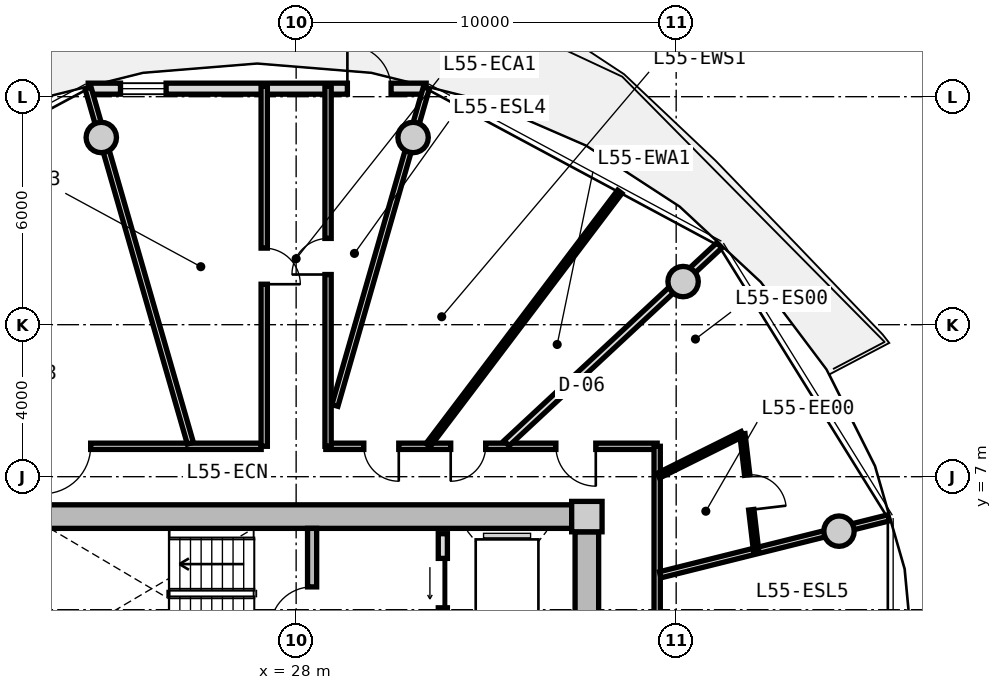
"""IFC4 building model, lengths in metres.
Left out: names, types, materials, properties, quantities, classifications, styles, units other than length and angle.
Written with IfcOpenShell. Run it as: python <this file> out.ifc"""

import sys

from ifc_helpers import new_model, si_unit, direction, frame, frame_2d, origin, origin_2d, place, context, subcontext, project, spatial, rectangle, circle, extrude, source, transform, mapped, element, fill, save


model = new_model("IFC4")
c1 = context("Model", 3, precision=1e-05, world=origin(), true_north=direction((0.0, 1.0)))
c2 = subcontext(c1, "Body", "Model", "MODEL_VIEW")
j1 = project(units=[si_unit("LENGTHUNIT", "METRE"), si_unit("PLANEANGLEUNIT", "RADIAN")], contexts=[c1])
p1 = place(None, origin())
s1 = spatial("IfcSite", under=j1, at=p1, CompositionType="ELEMENT")
p2 = place(p1, origin())
s2 = spatial("IfcBuilding", under=s1, at=p2, CompositionType="ELEMENT")
p3 = place(p2, frame((0.0, 0.0, 177.0)))
s3 = spatial("IfcBuildingStorey", under=s2, at=p3, CompositionType="ELEMENT", Elevation=177.0)
m1 = source(origin(), c2, "Body", "SweptSolid", [
    extrude(rectangle(XDim=0.8, YDim=0.8, at=origin_2d()), origin(), (0.0, 0.0, 1.0), 3.05),
])
p4 = place(p3, frame((35.65, 5.95, 0.0), z_axis=(0.0, 0.0, 1.0), x_axis=(1.0, 0.0, 0.0)))
e1 = element("IfcColumn", 1, at=p4, inside=s3, PredefinedType="COLUMN", context=c2, shape_type="MappedRepresentation", body=[
    mapped(m1, transform((0.0, 0.0, 0.0), x_axis=(1.0, 0.0, 0.0), y_axis=(0.0, 1.0, 0.0), z_axis=(0.0, 0.0, 1.0), scale=1.0)),
])
m2 = source(origin(), c2, "Body", "SweptSolid", [
    extrude(rectangle(XDim=14.5, YDim=0.62, at=frame_2d((7.25, 0.0))), origin(), (0.0, 0.0, 1.0), 2.81),
])
p5 = place(p3, frame((20.75, 5.95, 0.0), z_axis=(0.0, 0.0, 1.0), x_axis=(1.0, 0.0, 0.0)))
e2 = element("IfcWall", 2, at=p5, inside=s3, PredefinedType="SHEAR", context=c2, shape_type="MappedRepresentation", body=[
    mapped(m2, transform((0.0, 0.0, 0.0), x_axis=(1.0, 0.0, 0.0), y_axis=(0.0, 1.0, 0.0), z_axis=(0.0, 0.0, 1.0), scale=1.0)),
])
m3 = source(origin(), c2, "Body", "SweptSolid", [
    extrude(rectangle(XDim=11.1, YDim=0.62, at=frame_2d((5.55, 0.0))), origin(), (0.0, 0.0, 1.0), 2.81),
])
p6 = place(p3, frame((35.65, 5.55, 0.0), z_axis=(0.0, 0.0, 1.0), x_axis=(0.0, -1.0, 0.0)))
e3 = element("IfcWall", 3, at=p6, inside=s3, PredefinedType="SHEAR", context=c2, shape_type="MappedRepresentation", body=[
    mapped(m3, transform((0.0, 0.0, 0.0), x_axis=(1.0, 0.0, 0.0), y_axis=(0.0, 1.0, 0.0), z_axis=(0.0, 0.0, 1.0), scale=1.0)),
])
p7 = place(p6, frame((5.65, 0.0, 0.0)))
e4 = element("IfcOpeningElement", 4, at=p7, cuts=e3, PredefinedType="OPENING", context=c2, shape_type="SweptSolid", body=[
    extrude(rectangle(XDim=1.2, YDim=2.15, at=frame_2d((0.6, 1.075))), frame((0.0, 0.32, 0.0), z_axis=(0.0, -1.0, 0.0), x_axis=(1.0, 0.0, 0.0)), (0.0, 0.0, 1.0), 0.64),
])
m4 = source(origin(), c2, "Body", "SweptSolid", [
    extrude(circle(Radius=0.4, at=origin_2d()), origin(), (0.0, 0.0, 1.0), 3.05),
])
for number, where, z_axis, x_axis in (
    (5, (42.285, 5.567, 0.0), (0.0, 0.0, 1.0), (1.0, 0.0, 0.0)),
    (6, (38.183, 12.135, 0.0), (0.0, 0.0, 1.0), (1.0, 0.0, 0.0)),
    (7, (31.077, 15.926, 0.0), (0.0, 0.0, 1.0), (1.0, 0.0, 0.0)),
    (8, (22.873, 15.926, 0.0), (0.0, 0.0, 1.0), (1.0, 0.0, 0.0)),
):
    element("IfcColumn", number, at=place(p3, frame(where, z_axis=z_axis, x_axis=x_axis)), inside=s3, PredefinedType="COLUMN", context=c2, shape_type="MappedRepresentation", body=[
        mapped(m4, transform((0.0, 0.0, 0.0), x_axis=(1.0, 0.0, 0.0), y_axis=(0.0, 1.0, 0.0), z_axis=(0.0, 0.0, 1.0), scale=1.0)),
    ])
m5 = source(origin(), c2, "Body", "SweptSolid", [
    extrude(rectangle(XDim=8.893, YDim=0.29, at=frame_2d((4.447, 0.0))), origin(), (0.0, 0.0, 1.0), 2.81),
])
p8 = place(p3, frame((22.529, 17.211, 0.0), z_axis=(0.0, 0.0, 1.0), x_axis=(1.0, 0.0, 0.0)))
e9 = element("IfcWall", 9, at=p8, inside=s3, PredefinedType="SOLIDWALL", context=c2, shape_type="MappedRepresentation", body=[
    mapped(m5, transform((0.0, 0.0, 0.0), x_axis=(1.0, 0.0, 0.0), y_axis=(0.0, 1.0, 0.0), z_axis=(0.0, 0.0, 1.0), scale=1.0)),
])
p9 = place(p8, frame((6.82, 0.0, 0.0)))
e10 = element("IfcOpeningElement", 10, at=p9, cuts=e9, PredefinedType="OPENING", context=c2, shape_type="SweptSolid", body=[
    extrude(rectangle(XDim=1.15, YDim=2.25, at=frame_2d((0.575, 1.125))), frame((0.0, 0.155, 0.0), z_axis=(0.0, -1.0, 0.0), x_axis=(1.0, 0.0, 0.0)), (0.0, 0.0, 1.0), 0.31),
])
p10 = place(p8, frame((0.85, 0.0, 0.85)))
e11 = element("IfcOpeningElement", 11, at=p10, cuts=e9, PredefinedType="OPENING", context=c2, shape_type="SweptSolid", body=[
    extrude(rectangle(XDim=1.2, YDim=1.5, at=frame_2d((0.6, 0.75))), frame((0.0, 0.155, 0.0), z_axis=(0.0, -1.0, 0.0), x_axis=(1.0, 0.0, 0.0)), (0.0, 0.0, 1.0), 0.31),
])
m6 = source(origin(), c2, "Body", "SweptSolid", [
    extrude(rectangle(XDim=3.19, YDim=0.24, at=frame_2d((1.595, 0.0))), origin(), (0.0, 0.0, 1.0), 2.81),
])
p11 = place(p3, frame((28.42, 2.45, 0.0), z_axis=(0.0, 0.0, 1.0), x_axis=(0.0, 1.0, 0.0)))
e12 = element("IfcWall", 12, at=p11, inside=s3, PredefinedType="PARTITIONING", context=c2, shape_type="MappedRepresentation", body=[
    mapped(m6, transform((0.0, 0.0, 0.0), x_axis=(1.0, 0.0, 0.0), y_axis=(0.0, 1.0, 0.0), z_axis=(0.0, 0.0, 1.0), scale=1.0)),
])
p12 = place(p11, frame((0.55, 0.0, 0.0)))
e13 = element("IfcOpeningElement", 13, at=p12, cuts=e12, PredefinedType="OPENING", context=c2, shape_type="SweptSolid", body=[
    extrude(rectangle(XDim=1.1, YDim=2.15, at=frame_2d((0.55, 1.075))), frame((0.0, 0.13, 0.0), z_axis=(0.0, -1.0, 0.0), x_axis=(1.0, 0.0, 0.0)), (0.0, 0.0, 1.0), 0.26),
])
m7 = source(origin(), c2, "Body", "SweptSolid", [
    extrude(rectangle(XDim=5.0, YDim=0.24, at=frame_2d((2.5, 0.0))), origin(), (0.0, 0.0, 1.0), 2.795),
])
p13 = place(p3, frame((31.86, 0.5, 0.0), z_axis=(0.0, 0.0, 1.0), x_axis=(0.0, 1.0, 0.0)))
e14 = element("IfcWall", 14, at=p13, inside=s3, PredefinedType="PARTITIONING", context=c2, shape_type="MappedRepresentation", body=[
    mapped(m7, transform((0.0, 0.0, 0.0), x_axis=(1.0, 0.0, 0.0), y_axis=(0.0, 1.0, 0.0), z_axis=(0.0, 0.0, 1.0), scale=1.0)),
])
p14 = place(p13, frame((3.05, 0.0, 0.0)))
e15 = element("IfcOpeningElement", 15, at=p14, cuts=e14, PredefinedType="OPENING", context=c2, shape_type="SweptSolid", body=[
    extrude(rectangle(XDim=1.3, YDim=2.2, at=frame_2d((0.65, 1.1))), frame((0.0, 0.13, 0.0), z_axis=(0.0, -1.0, 0.0), x_axis=(1.0, 0.0, 0.0)), (0.0, 0.0, 1.0), 0.26),
])
p15 = place(p13, frame((0.55, 0.0, 0.0)))
e16 = element("IfcOpeningElement", 16, at=p15, cuts=e14, PredefinedType="OPENING", context=c2, shape_type="SweptSolid", body=[
    extrude(rectangle(XDim=1.3, YDim=2.2, at=frame_2d((0.65, 1.1))), frame((0.0, 0.13, 0.0), z_axis=(0.0, -1.0, 0.0), x_axis=(1.0, 0.0, 0.0)), (0.0, 0.0, 1.0), 0.26),
])
m8 = source(origin(), c2, "Body", "SweptSolid", [
    extrude(rectangle(XDim=8.58, YDim=0.165, at=frame_2d((4.29, 0.0))), origin(), (0.0, 0.0, 1.0), 2.795),
])
p16 = place(p3, frame((18.5, 7.8, 0.0), z_axis=(0.0, 0.0, 1.0), x_axis=(1.0, 0.0, 0.0)))
e17 = element("IfcWall", 17, at=p16, inside=s3, PredefinedType="PARTITIONING", context=c2, shape_type="MappedRepresentation", body=[
    mapped(m8, transform((0.0, 0.0, 0.0), x_axis=(1.0, 0.0, 0.0), y_axis=(0.0, 1.0, 0.0), z_axis=(0.0, 0.0, 1.0), scale=1.0)),
])
p17 = place(p16, frame((2.843, 0.0, 0.0)))
e18 = element("IfcOpeningElement", 18, at=p17, cuts=e17, PredefinedType="OPENING", context=c2, shape_type="SweptSolid", body=[
    extrude(rectangle(XDim=1.25, YDim=2.2, at=frame_2d((0.625, 1.1))), frame((0.0, 0.093, 0.0), z_axis=(0.0, -1.0, 0.0), x_axis=(1.0, 0.0, 0.0)), (0.0, 0.0, 1.0), 0.185),
])
m9 = source(origin(), c2, "Body", "SweptSolid", [
    extrude(rectangle(XDim=8.719, YDim=0.165, at=frame_2d((4.36, 0.0))), origin(), (0.0, 0.0, 1.0), 2.795),
])
p18 = place(p3, frame((28.781, 7.8, 0.0), z_axis=(0.0, 0.0, 1.0), x_axis=(1.0, 0.0, 0.0)))
e19 = element("IfcWall", 19, at=p18, inside=s3, PredefinedType="PARTITIONING", context=c2, shape_type="MappedRepresentation", body=[
    mapped(m9, transform((0.0, 0.0, 0.0), x_axis=(1.0, 0.0, 0.0), y_axis=(0.0, 1.0, 0.0), z_axis=(0.0, 0.0, 1.0), scale=1.0)),
])
p19 = place(p18, frame((6.054, 0.0, 0.0)))
e20 = element("IfcOpeningElement", 20, at=p19, cuts=e19, PredefinedType="OPENING", context=c2, shape_type="SweptSolid", body=[
    extrude(rectangle(XDim=1.05, YDim=2.15, at=frame_2d((0.525, 1.075))), frame((0.0, 0.093, 0.0), z_axis=(0.0, -1.0, 0.0), x_axis=(1.0, 0.0, 0.0)), (0.0, 0.0, 1.0), 0.185),
])
p20 = place(p18, frame((3.287, 0.0, 0.0)))
e21 = element("IfcOpeningElement", 21, at=p20, cuts=e19, PredefinedType="OPENING", context=c2, shape_type="SweptSolid", body=[
    extrude(rectangle(XDim=0.92, YDim=2.1, at=frame_2d((0.46, 1.05))), frame((0.0, 0.093, 0.0), z_axis=(0.0, -1.0, 0.0), x_axis=(1.0, 0.0, 0.0)), (0.0, 0.0, 1.0), 0.185),
])
p21 = place(p18, frame((1.0, 0.0, 0.0)))
e22 = element("IfcOpeningElement", 22, at=p21, cuts=e19, PredefinedType="OPENING", context=c2, shape_type="SweptSolid", body=[
    extrude(rectangle(XDim=0.92, YDim=2.1, at=frame_2d((0.46, 1.05))), frame((0.0, 0.093, 0.0), z_axis=(0.0, -1.0, 0.0), x_axis=(1.0, 0.0, 0.0)), (0.0, 0.0, 1.0), 0.185),
])
m10 = source(origin(), c2, "Body", "SweptSolid", [
    extrude(rectangle(XDim=6.88, YDim=0.165, at=frame_2d((3.44, 0.0))), origin(), (0.0, 0.0, 1.0), 2.795),
])
p22 = place(p3, frame((37.5, 7.8, 0.0), z_axis=(0.0, 0.0, 1.0), x_axis=(0.0, -1.0, 0.0)))
e23 = element("IfcWall", 23, at=p22, inside=s3, PredefinedType="PARTITIONING", context=c2, shape_type="MappedRepresentation", body=[
    mapped(m10, transform((0.0, 0.0, 0.0), x_axis=(1.0, 0.0, 0.0), y_axis=(0.0, 1.0, 0.0), z_axis=(0.0, 0.0, 1.0), scale=1.0)),
])
m11 = source(origin(), c2, "Body", "SweptSolid", [
    extrude(rectangle(XDim=8.695, YDim=0.165, at=frame_2d((4.348, 0.0))), origin(), (0.0, 0.0, 1.0), 2.345),
])
p23 = place(p3, frame((29.02, 8.875, 0.0), z_axis=(0.0, 0.0, 1.0), x_axis=(0.276797231892, 0.960928349263, 0.0)))
e24 = element("IfcWall", 24, at=p23, inside=s3, PredefinedType="PARTITIONING", context=c2, shape_type="MappedRepresentation", body=[
    mapped(m11, transform((0.0, 0.0, 0.0), x_axis=(1.0, 0.0, 0.0), y_axis=(0.0, 1.0, 0.0), z_axis=(0.0, 0.0, 1.0), scale=1.0)),
])
m12 = source(origin(), c2, "Body", "SweptSolid", [
    extrude(rectangle(XDim=9.73, YDim=0.165, at=frame_2d((4.865, 0.0))), origin(), (0.0, 0.0, 1.0), 2.345),
])
p24 = place(p3, frame((25.217, 7.88, 0.0), z_axis=(0.0, 0.0, 1.0), x_axis=(-0.27679492614, 0.960929013436, 0.0)))
e25 = element("IfcWall", 25, at=p24, inside=s3, PredefinedType="PARTITIONING", context=c2, shape_type="MappedRepresentation", body=[
    mapped(m12, transform((0.0, 0.0, 0.0), x_axis=(1.0, 0.0, 0.0), y_axis=(0.0, 1.0, 0.0), z_axis=(0.0, 0.0, 1.0), scale=1.0)),
])
m13 = source(origin(), c2, "Body", "SweptSolid", [
    extrude(rectangle(XDim=6.193, YDim=0.165, at=frame_2d((3.096, 0.0))), origin(), (0.0, 0.0, 1.0), 2.345),
])
p25 = place(p3, frame((37.58, 4.419, 0.0), z_axis=(0.0, 0.0, 1.0), x_axis=(0.970309243466, 0.241867674657, 0.0)))
e26 = element("IfcWall", 26, at=p25, inside=s3, PredefinedType="PARTITIONING", context=c2, shape_type="MappedRepresentation", body=[
    mapped(m13, transform((0.0, 0.0, 0.0), x_axis=(1.0, 0.0, 0.0), y_axis=(0.0, 1.0, 0.0), z_axis=(0.0, 0.0, 1.0), scale=1.0)),
])
m14 = source(origin(), c2, "Body", "SweptSolid", [
    extrude(rectangle(XDim=9.48, YDim=0.165, at=frame_2d((4.74, 0.0))), origin(), (0.0, 0.0, 1.0), 2.795),
])
p26 = place(p3, frame((27.16, 7.8, 0.0), z_axis=(0.0, 0.0, 1.0), x_axis=(0.0, 1.0, 0.0)))
e27 = element("IfcWall", 27, at=p26, inside=s3, PredefinedType="PARTITIONING", context=c2, shape_type="MappedRepresentation", body=[
    mapped(m14, transform((0.0, 0.0, 0.0), x_axis=(1.0, 0.0, 0.0), y_axis=(0.0, 1.0, 0.0), z_axis=(0.0, 0.0, 1.0), scale=1.0)),
])
p27 = place(p26, frame((4.265, 0.0, 0.0)))
e28 = element("IfcOpeningElement", 28, at=p27, cuts=e27, PredefinedType="OPENING", context=c2, shape_type="SweptSolid", body=[
    extrude(rectangle(XDim=0.95, YDim=2.1, at=frame_2d((0.475, 1.05))), frame((0.0, 0.093, 0.0), z_axis=(0.0, -1.0, 0.0), x_axis=(1.0, 0.0, 0.0)), (0.0, 0.0, 1.0), 0.185),
])
p28 = place(p3, frame((28.84, 17.28, 0.0), z_axis=(0.0, 0.0, 1.0), x_axis=(0.0, -1.0, 0.0)))
e29 = element("IfcWall", 29, at=p28, inside=s3, PredefinedType="PARTITIONING", context=c2, shape_type="MappedRepresentation", body=[
    mapped(m14, transform((0.0, 0.0, 0.0), x_axis=(1.0, 0.0, 0.0), y_axis=(0.0, 1.0, 0.0), z_axis=(0.0, 0.0, 1.0), scale=1.0)),
])
p29 = place(p28, frame((4.01, 0.0, 0.0)))
e30 = element("IfcOpeningElement", 30, at=p29, cuts=e29, PredefinedType="OPENING", context=c2, shape_type="SweptSolid", body=[
    extrude(rectangle(XDim=0.95, YDim=2.1, at=frame_2d((0.475, 1.05))), frame((0.0, 0.093, 0.0), z_axis=(0.0, -1.0, 0.0), x_axis=(1.0, 0.0, 0.0)), (0.0, 0.0, 1.0), 0.185),
])
m15 = source(origin(), c2, "Body", "SweptSolid", [
    extrude(rectangle(XDim=7.648, YDim=0.19, at=frame_2d((3.824, 0.0))), origin(), (0.0, 0.0, 1.0), 2.345),
])
p30 = place(p3, frame((33.538, 7.88, 0.0), z_axis=(0.0, 0.0, 1.0), x_axis=(0.732167856666, 0.681124239522, 0.0)))
e31 = element("IfcWall", 31, at=p30, inside=s3, PredefinedType="PARTITIONING", context=c2, shape_type="MappedRepresentation", body=[
    mapped(m15, transform((0.0, 0.0, 0.0), x_axis=(1.0, 0.0, 0.0), y_axis=(0.0, 1.0, 0.0), z_axis=(0.0, 0.0, 1.0), scale=1.0)),
])
m16 = source(origin(), c2, "Body", "SweptSolid", [
    extrude(rectangle(XDim=2.471, YDim=0.14, at=frame_2d((1.235, 0.0))), origin(), (0.0, 0.0, 1.0), 2.795),
])
p31 = place(p3, frame((37.53, 7.026, 0.0), z_axis=(0.0, 0.0, 1.0), x_axis=(0.895295102372, 0.445473545419, 0.0)))
e32 = element("IfcWall", 32, at=p31, inside=s3, PredefinedType="PARTITIONING", context=c2, shape_type="MappedRepresentation", body=[
    mapped(m16, transform((0.0, 0.0, 0.0), x_axis=(1.0, 0.0, 0.0), y_axis=(0.0, 1.0, 0.0), z_axis=(0.0, 0.0, 1.0), scale=1.0)),
])
m17 = source(origin(), c2, "Body", "SweptSolid", [
    extrude(rectangle(XDim=3.101, YDim=0.14, at=frame_2d((1.551, 0.0))), origin(), (0.0, 0.0, 1.0), 2.795),
])
p32 = place(p3, frame((39.742, 8.127, 0.0), z_axis=(0.0, 0.0, 1.0), x_axis=(0.116754457614, -0.993160811061, 0.0)))
e33 = element("IfcWall", 33, at=p32, inside=s3, PredefinedType="PARTITIONING", context=c2, shape_type="MappedRepresentation", body=[
    mapped(m17, transform((0.0, 0.0, 0.0), x_axis=(1.0, 0.0, 0.0), y_axis=(0.0, 1.0, 0.0), z_axis=(0.0, 0.0, 1.0), scale=1.0)),
])
p33 = place(p32, frame((1.09, 0.0, 0.0)))
e34 = element("IfcOpeningElement", 34, at=p33, cuts=e33, PredefinedType="OPENING", context=c2, shape_type="SweptSolid", body=[
    extrude(rectangle(XDim=0.92, YDim=2.1, at=frame_2d((0.46, 1.05))), frame((0.0, 0.08, 0.0), z_axis=(0.0, -1.0, 0.0), x_axis=(1.0, 0.0, 0.0)), (0.0, 0.0, 1.0), 0.16),
])
m18 = source(origin(), c2, "Body", "SweptSolid", [
    extrude(rectangle(XDim=8.359, YDim=0.14, at=frame_2d((4.18, 0.0))), origin(), (0.0, 0.0, 1.0), 2.795),
])
p34 = place(p3, frame((31.473, 7.83, 0.0), z_axis=(0.0, 0.0, 1.0), x_axis=(0.603265985309, 0.797540062297, 0.0)))
e35 = element("IfcWall", 35, at=p34, inside=s3, PredefinedType="PARTITIONING", context=c2, shape_type="MappedRepresentation", body=[
    mapped(m18, transform((0.0, 0.0, 0.0), x_axis=(1.0, 0.0, 0.0), y_axis=(0.0, 1.0, 0.0), z_axis=(0.0, 0.0, 1.0), scale=1.0)),
])
m19 = source(origin(), c2, "Body", "SweptSolid", [
    extrude(rectangle(XDim=1.15, YDim=2.25, at=frame_2d((0.575, 1.125))), frame((0.0, 0.025, 0.0), z_axis=(0.0, -1.0, 0.0), x_axis=(1.0, 0.0, 0.0)), (0.0, 0.0, 1.0), 0.05),
])
p35 = place(p9, origin())
e36 = element("IfcDoor", 36, at=p35, inside=s3, OperationType="SINGLE_SWING_LEFT", PredefinedType="DOOR", context=c2, shape_type="MappedRepresentation", body=[
    mapped(m19, transform((0.0, 0.0, 0.0), x_axis=(1.0, 0.0, 0.0), y_axis=(0.0, 1.0, 0.0), z_axis=(0.0, 0.0, 1.0), scale=1.0)),
])
fill(e10, e36)
m20 = source(origin(), c2, "Body", "SweptSolid", [
    extrude(rectangle(XDim=1.2, YDim=1.5, at=frame_2d((0.6, 0.75))), frame((0.0, 0.03, 0.0), z_axis=(0.0, -1.0, 0.0), x_axis=(1.0, 0.0, 0.0)), (0.0, 0.0, 1.0), 0.06),
])
p36 = place(p10, origin())
e37 = element("IfcWindow", 37, at=p36, inside=s3, PartitioningType="SINGLE_PANEL", PredefinedType="WINDOW", context=c2, shape_type="MappedRepresentation", body=[
    mapped(m20, transform((0.0, 0.0, 0.0), x_axis=(1.0, 0.0, 0.0), y_axis=(0.0, 1.0, 0.0), z_axis=(0.0, 0.0, 1.0), scale=1.0)),
])
fill(e11, e37)
m21 = source(origin(), c2, "Body", "SweptSolid", [
    extrude(rectangle(XDim=1.1, YDim=2.15, at=frame_2d((0.55, 1.075))), frame((0.0, 0.025, 0.0), z_axis=(0.0, -1.0, 0.0), x_axis=(1.0, 0.0, 0.0)), (0.0, 0.0, 1.0), 0.05),
])
p37 = place(p12, origin())
e38 = element("IfcDoor", 38, at=p37, inside=s3, OperationType="SINGLE_SWING_LEFT", PredefinedType="DOOR", context=c2, shape_type="MappedRepresentation", body=[
    mapped(m21, transform((0.0, 0.0, 0.0), x_axis=(1.0, 0.0, 0.0), y_axis=(0.0, 1.0, 0.0), z_axis=(0.0, 0.0, 1.0), scale=1.0)),
])
fill(e13, e38)
m22 = source(origin(), c2, "Body", "SweptSolid", [
    extrude(rectangle(XDim=1.3, YDim=2.2, at=frame_2d((0.65, 1.1))), frame((0.0, 0.025, 0.0), z_axis=(0.0, -1.0, 0.0), x_axis=(1.0, 0.0, 0.0)), (0.0, 0.0, 1.0), 0.05),
])
p38 = place(p14, origin())
e39 = element("IfcDoor", 39, at=p38, inside=s3, OperationType="SLIDING_TO_LEFT", PredefinedType="DOOR", context=c2, shape_type="MappedRepresentation", body=[
    mapped(m22, transform((0.0, 0.0, 0.0), x_axis=(1.0, 0.0, 0.0), y_axis=(0.0, 1.0, 0.0), z_axis=(0.0, 0.0, 1.0), scale=1.0)),
])
fill(e15, e39)
m23 = source(origin(), c2, "Body", "SweptSolid", [
    extrude(rectangle(XDim=0.95, YDim=2.1, at=frame_2d((0.475, 1.05))), frame((0.0, 0.025, 0.0), z_axis=(0.0, -1.0, 0.0), x_axis=(1.0, 0.0, 0.0)), (0.0, 0.0, 1.0), 0.05),
])
p39 = place(p27, frame((0.95, 0.0, 0.0), z_axis=(0.0, 0.0, 1.0), x_axis=(-1.0, 0.0, 0.0)))
e40 = element("IfcDoor", 40, at=p39, inside=s3, OperationType="SINGLE_SWING_RIGHT", PredefinedType="DOOR", context=c2, shape_type="MappedRepresentation", body=[
    mapped(m23, transform((0.0, 0.0, 0.0), x_axis=(1.0, 0.0, 0.0), y_axis=(0.0, 1.0, 0.0), z_axis=(0.0, 0.0, 1.0), scale=1.0)),
])
fill(e28, e40)
p40 = place(p29, frame((0.95, 0.0, 0.0), z_axis=(0.0, 0.0, 1.0), x_axis=(-1.0, 0.0, 0.0)))
e41 = element("IfcDoor", 41, at=p40, inside=s3, OperationType="SINGLE_SWING_LEFT", PredefinedType="DOOR", context=c2, shape_type="MappedRepresentation", body=[
    mapped(m23, transform((0.0, 0.0, 0.0), x_axis=(1.0, 0.0, 0.0), y_axis=(0.0, 1.0, 0.0), z_axis=(0.0, 0.0, 1.0), scale=1.0)),
])
fill(e30, e41)
m24 = source(origin(), c2, "Body", "SweptSolid", [
    extrude(rectangle(XDim=1.05, YDim=2.15, at=frame_2d((0.525, 1.075))), frame((0.0, 0.025, 0.0), z_axis=(0.0, -1.0, 0.0), x_axis=(1.0, 0.0, 0.0)), (0.0, 0.0, 1.0), 0.05),
])
p41 = place(p19, frame((1.05, 0.0, 0.0), z_axis=(0.0, 0.0, 1.0), x_axis=(-1.0, 0.0, 0.0)))
e42 = element("IfcDoor", 42, at=p41, inside=s3, OperationType="SINGLE_SWING_LEFT", PredefinedType="DOOR", context=c2, shape_type="MappedRepresentation", body=[
    mapped(m24, transform((0.0, 0.0, 0.0), x_axis=(1.0, 0.0, 0.0), y_axis=(0.0, 1.0, 0.0), z_axis=(0.0, 0.0, 1.0), scale=1.0)),
])
fill(e20, e42)
m25 = source(origin(), c2, "Body", "SweptSolid", [
    extrude(rectangle(XDim=0.92, YDim=2.1, at=frame_2d((0.46, 1.05))), frame((0.0, 0.025, 0.0), z_axis=(0.0, -1.0, 0.0), x_axis=(1.0, 0.0, 0.0)), (0.0, 0.0, 1.0), 0.05),
])
p42 = place(p33, origin())
e43 = element("IfcDoor", 43, at=p42, inside=s3, OperationType="SINGLE_SWING_RIGHT", PredefinedType="DOOR", context=c2, shape_type="MappedRepresentation", body=[
    mapped(m25, transform((0.0, 0.0, 0.0), x_axis=(1.0, 0.0, 0.0), y_axis=(0.0, 1.0, 0.0), z_axis=(0.0, 0.0, 1.0), scale=1.0)),
])
fill(e34, e43)
p43 = place(p20, frame((0.92, 0.0, 0.0), z_axis=(0.0, 0.0, 1.0), x_axis=(-1.0, 0.0, 0.0)))
e44 = element("IfcDoor", 44, at=p43, inside=s3, OperationType="SINGLE_SWING_RIGHT", PredefinedType="DOOR", context=c2, shape_type="MappedRepresentation", body=[
    mapped(m25, transform((0.0, 0.0, 0.0), x_axis=(1.0, 0.0, 0.0), y_axis=(0.0, 1.0, 0.0), z_axis=(0.0, 0.0, 1.0), scale=1.0)),
])
fill(e21, e44)
p44 = place(p21, frame((0.92, 0.0, 0.0), z_axis=(0.0, 0.0, 1.0), x_axis=(-1.0, 0.0, 0.0)))
e45 = element("IfcDoor", 45, at=p44, inside=s3, OperationType="SINGLE_SWING_LEFT", PredefinedType="DOOR", context=c2, shape_type="MappedRepresentation", body=[
    mapped(m25, transform((0.0, 0.0, 0.0), x_axis=(1.0, 0.0, 0.0), y_axis=(0.0, 1.0, 0.0), z_axis=(0.0, 0.0, 1.0), scale=1.0)),
])
fill(e22, e45)
m26 = source(origin(), c2, "Body", "SweptSolid", [
    extrude(rectangle(XDim=1.25, YDim=2.2, at=frame_2d((0.625, 1.1))), frame((0.0, 0.025, 0.0), z_axis=(0.0, -1.0, 0.0), x_axis=(1.0, 0.0, 0.0)), (0.0, 0.0, 1.0), 0.05),
])
p45 = place(p17, frame((1.25, 0.0, 0.0), z_axis=(0.0, 0.0, 1.0), x_axis=(-1.0, 0.0, 0.0)))
e46 = element("IfcDoor", 46, at=p45, inside=s3, OperationType="SINGLE_SWING_RIGHT", PredefinedType="DOOR", context=c2, shape_type="MappedRepresentation", body=[
    mapped(m26, transform((0.0, 0.0, 0.0), x_axis=(1.0, 0.0, 0.0), y_axis=(0.0, 1.0, 0.0), z_axis=(0.0, 0.0, 1.0), scale=1.0)),
])
fill(e18, e46)
save(model, sys.argv[1])
